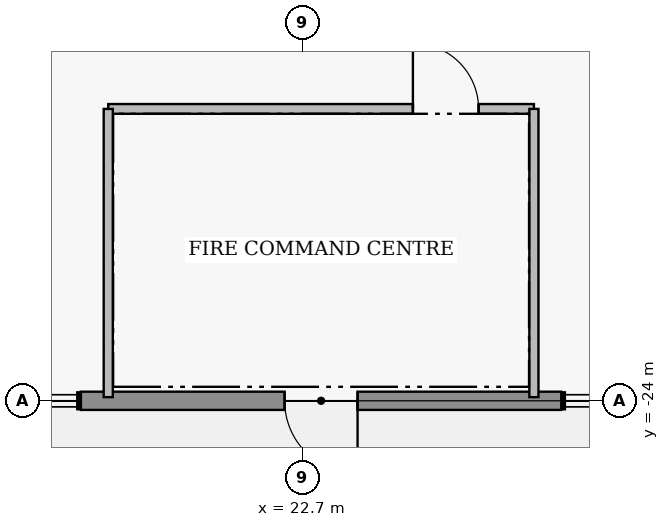
"""IFC4 building model, lengths in metres.
Left out: names, types, materials, properties, quantities, classifications, styles, units other than length and angle.
Written with IfcOpenShell. Run it as: python <this file> out.ifc"""

import sys

from ifc_helpers import new_model, si_unit, direction, frame, frame_2d, origin, place, context, subcontext, project, spatial, rectangle, extrude, element, fill, save


model = new_model("IFC4")
c1 = context("Model", 3, precision=1e-05, world=origin(), true_north=direction((0.0, 1.0)))
c2 = subcontext(c1, "Body", "Model", "MODEL_VIEW")
j1 = project(units=[si_unit("LENGTHUNIT", "METRE"), si_unit("PLANEANGLEUNIT", "RADIAN")], contexts=[c1])
p1 = place(None, origin())
s1 = spatial("IfcSite", under=j1, at=p1, CompositionType="ELEMENT")
p2 = place(p1, origin())
s2 = spatial("IfcBuilding", under=s1, at=p2, CompositionType="ELEMENT")
p3 = place(p2, origin())
s3 = spatial("IfcBuildingStorey", under=s2, at=p3, CompositionType="ELEMENT", Elevation=0.0)
p4 = place(p3, frame((26.95, -24.0, 0.0), z_axis=(0.0, 0.0, 1.0), x_axis=(-1.0, 0.0, 0.0)))
e1 = element("IfcWall", 1, at=p4, inside=s3, PredefinedType="STANDARD", context=c2, shape_type="SweptSolid", body=[
    extrude(rectangle(XDim=7.9, YDim=0.3, at=frame_2d((3.95, 0.0))), origin(), (0.0, 0.0, 1.0), 5.75),
])
p5 = place(p4, frame((3.35, 0.0, 0.0)))
e2 = element("IfcOpeningElement", 2, at=p5, cuts=e1, PredefinedType="OPENING", context=c2, shape_type="SweptSolid", body=[
    extrude(rectangle(XDim=1.2, YDim=2.2, at=frame_2d((0.6, 1.1))), frame((0.0, 0.16, 0.0), z_axis=(0.0, -1.0, 0.0), x_axis=(1.0, 0.0, 0.0)), (0.0, 0.0, 1.0), 0.32),
])
p6 = place(p3, frame((19.5, -19.2, 0.0), z_axis=(0.0, 0.0, 1.0), x_axis=(1.0, 0.0, 0.0)))
e3 = element("IfcWall", 3, at=p6, inside=s3, PredefinedType="PARTITIONING", context=c2, shape_type="SweptSolid", body=[
    extrude(rectangle(XDim=7.0, YDim=0.16, at=frame_2d((3.5, 0.0))), origin(), (0.0, 0.0, 1.0), 5.75),
])
p7 = place(p6, frame((5.01, 0.0, 0.0)))
e4 = element("IfcOpeningElement", 4, at=p7, cuts=e3, PredefinedType="OPENING", context=c2, shape_type="SweptSolid", body=[
    extrude(rectangle(XDim=1.08, YDim=2.18, at=frame_2d((0.54, 1.09))), frame((0.0, 0.09, 0.0), z_axis=(0.0, -1.0, 0.0), x_axis=(1.0, 0.0, 0.0)), (0.0, 0.0, 1.0), 0.18),
])
for number, where, z_axis, x_axis in (
    (5, (19.5, -23.94, 0.0), (0.0, 0.0, 1.0), (0.0, 1.0, 0.0)),
    (6, (26.5, -23.94, 0.0), (0.0, 0.0, 1.0), (0.0, 1.0, 0.0)),
):
    element("IfcWall", number, at=place(p3, frame(where, z_axis=z_axis, x_axis=x_axis)), inside=s3, PredefinedType="PARTITIONING", context=c2, shape_type="SweptSolid", body=[
        extrude(rectangle(XDim=4.74, YDim=0.15, at=frame_2d((2.37, 0.0))), origin(), (0.0, 0.0, 1.0), 5.75),
    ])
p8 = place(p5, origin())
e7 = element("IfcDoor", 7, at=p8, inside=s3, OperationType="SINGLE_SWING_LEFT", PredefinedType="DOOR", context=c2, shape_type="SweptSolid", body=[
    extrude(rectangle(XDim=1.2, YDim=2.2, at=frame_2d((0.6, 1.1))), frame((0.0, 0.025, 0.0), z_axis=(0.0, -1.0, 0.0), x_axis=(1.0, 0.0, 0.0)), (0.0, 0.0, 1.0), 0.05),
])
fill(e2, e7)
p9 = place(p7, origin())
e8 = element("IfcDoor", 8, at=p9, inside=s3, OperationType="SINGLE_SWING_LEFT", PredefinedType="DOOR", context=c2, shape_type="SweptSolid", body=[
    extrude(rectangle(XDim=1.08, YDim=2.18, at=frame_2d((0.54, 1.09))), frame((0.0, 0.025, 0.0), z_axis=(0.0, -1.0, 0.0), x_axis=(1.0, 0.0, 0.0)), (0.0, 0.0, 1.0), 0.05),
])
fill(e4, e8)
save(model, sys.argv[1])
